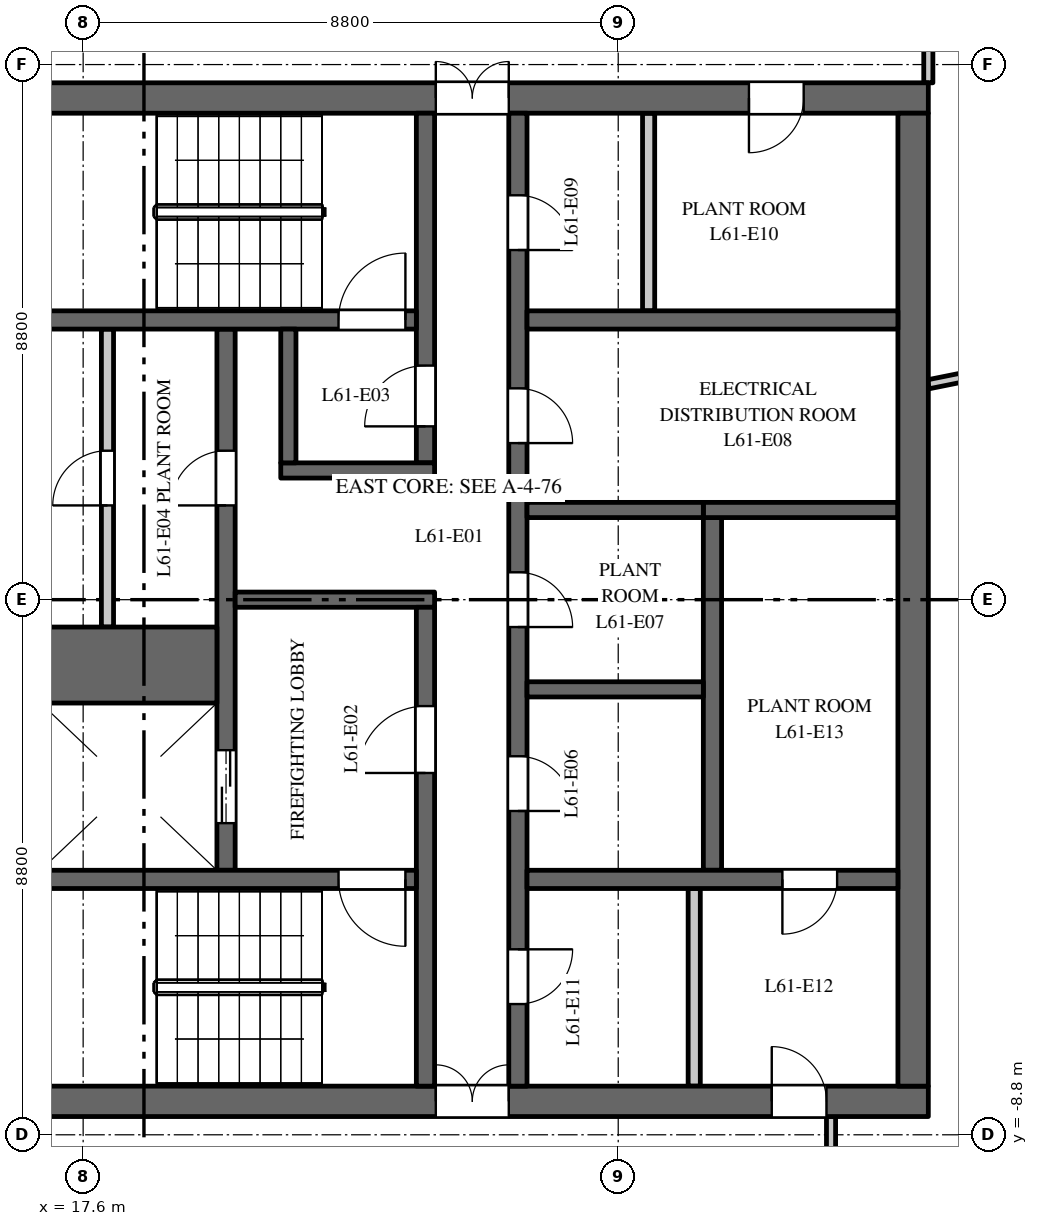
"""IFC4 building model, lengths in metres.
Left out: names, types, materials, properties, quantities, classifications, styles, units other than length and angle.
Written with IfcOpenShell. Run it as: python <this file> out.ifc"""

import sys

from ifc_helpers import new_model, si_unit, direction, frame, frame_2d, origin, place, context, subcontext, project, spatial, rectangle, extrude, element, fill, save


model = new_model("IFC4")
c1 = context("Model", 3, precision=1e-05, world=origin(), true_north=direction((0.0, 1.0)))
c2 = subcontext(c1, "Body", "Model", "MODEL_VIEW")
j1 = project(units=[si_unit("LENGTHUNIT", "METRE"), si_unit("PLANEANGLEUNIT", "RADIAN")], contexts=[c1])
p1 = place(None, origin())
s1 = spatial("IfcSite", under=j1, at=p1, CompositionType="ELEMENT")
p2 = place(p1, origin())
s2 = spatial("IfcBuilding", under=s1, at=p2, CompositionType="ELEMENT")
p3 = place(p2, frame((0.0, 0.0, 285.5)))
s3 = spatial("IfcBuildingStorey", under=s2, at=p3, CompositionType="ELEMENT", Elevation=285.5)
p4 = place(p3, frame((16.5, 8.25, 0.0), z_axis=(0.0, 0.0, 1.0), x_axis=(1.0, 0.0, 0.0)))
e1 = element("IfcWall", 1, at=p4, inside=s3, PredefinedType="SHEAR", context=c2, shape_type="SweptSolid", body=[
    extrude(rectangle(XDim=15.0, YDim=0.5, at=frame_2d((7.5, 0.0))), origin(), (0.0, 0.0, 1.0), 5.2),
])
p5 = place(p4, frame((6.9, 0.0, 0.0)))
e2 = element("IfcOpeningElement", 2, at=p5, cuts=e1, PredefinedType="OPENING", context=c2, shape_type="SweptSolid", body=[
    extrude(rectangle(XDim=1.2, YDim=2.1, at=frame_2d((0.6, 1.05))), frame((0.0, 0.26, 0.0), z_axis=(0.0, -1.0, 0.0), x_axis=(1.0, 0.0, 0.0)), (0.0, 0.0, 1.0), 0.52),
])
p6 = place(p4, frame((12.05, 0.0, 0.0)))
e3 = element("IfcOpeningElement", 3, at=p6, cuts=e1, PredefinedType="OPENING", context=c2, shape_type="SweptSolid", body=[
    extrude(rectangle(XDim=0.9, YDim=2.1, at=frame_2d((0.45, 1.05))), frame((0.0, 0.26, 0.0), z_axis=(0.0, -1.0, 0.0), x_axis=(1.0, 0.0, 0.0)), (0.0, 0.0, 1.0), 0.52),
])
p7 = place(p3, frame((16.5, -8.25, 0.0), z_axis=(0.0, 0.0, 1.0), x_axis=(1.0, 0.0, 0.0)))
e4 = element("IfcWall", 4, at=p7, inside=s3, PredefinedType="SHEAR", context=c2, shape_type="SweptSolid", body=[
    extrude(rectangle(XDim=15.0, YDim=0.5, at=frame_2d((7.5, 0.0))), origin(), (0.0, 0.0, 1.0), 5.2),
])
p8 = place(p7, frame((6.9, 0.0, 0.0)))
e5 = element("IfcOpeningElement", 5, at=p8, cuts=e4, PredefinedType="OPENING", context=c2, shape_type="SweptSolid", body=[
    extrude(rectangle(XDim=1.2, YDim=2.1, at=frame_2d((0.6, 1.05))), frame((0.0, 0.26, 0.0), z_axis=(0.0, -1.0, 0.0), x_axis=(1.0, 0.0, 0.0)), (0.0, 0.0, 1.0), 0.52),
])
p9 = place(p7, frame((12.425, 0.0, 0.0)))
e6 = element("IfcOpeningElement", 6, at=p9, cuts=e4, PredefinedType="OPENING", context=c2, shape_type="SweptSolid", body=[
    extrude(rectangle(XDim=0.9, YDim=2.1, at=frame_2d((0.45, 1.05))), frame((0.0, 0.26, 0.0), z_axis=(0.0, -1.0, 0.0), x_axis=(1.0, 0.0, 0.0)), (0.0, 0.0, 1.0), 0.52),
])
p10 = place(p3, frame((18.0, -0.45, 0.0), z_axis=(0.0, 0.0, 1.0), x_axis=(0.0, 1.0, 0.0)))
e7 = element("IfcWall", 7, at=p10, inside=s3, PredefinedType="PARTITIONING", context=c2, shape_type="SweptSolid", body=[
    extrude(rectangle(XDim=4.9, YDim=0.2, at=frame_2d((2.45, 0.0))), origin(), (0.0, 0.0, 1.0), 5.2),
])
p11 = place(p10, frame((2.0, 0.0, 0.0)))
e8 = element("IfcOpeningElement", 8, at=p11, cuts=e7, PredefinedType="OPENING", context=c2, shape_type="SweptSolid", body=[
    extrude(rectangle(XDim=0.9, YDim=2.1, at=frame_2d((0.45, 1.05))), frame((0.0, 0.11, 0.0), z_axis=(0.0, -1.0, 0.0), x_axis=(1.0, 0.0, 0.0)), (0.0, 0.0, 1.0), 0.22),
])
p12 = place(p3, frame((27.95, -4.45, 0.0), z_axis=(0.0, 0.0, 1.0), x_axis=(0.0, 1.0, 0.0)))
e9 = element("IfcWall", 9, at=p12, inside=s3, PredefinedType="SHEAR", context=c2, shape_type="SweptSolid", body=[
    extrude(rectangle(XDim=5.8, YDim=0.3, at=frame_2d((2.9, 0.0))), origin(), (0.0, 0.0, 1.0), 5.2),
])
p13 = place(p3, frame((27.8, 1.475, 0.0), z_axis=(0.0, 0.0, 1.0), x_axis=(1.0, 0.0, 0.0)))
e10 = element("IfcWall", 10, at=p13, inside=s3, PredefinedType="SHEAR", context=c2, shape_type="SweptSolid", body=[
    extrude(rectangle(XDim=3.2, YDim=0.25, at=frame_2d((1.6, 0.0))), origin(), (0.0, 0.0, 1.0), 5.2),
])
p14 = place(p3, frame((19.95, -4.45, 0.0), z_axis=(0.0, 0.0, 1.0), x_axis=(0.0, 1.0, 0.0)))
e11 = element("IfcWall", 11, at=p14, inside=s3, PredefinedType="SHEAR", context=c2, shape_type="SweptSolid", body=[
    extrude(rectangle(XDim=8.9, YDim=0.3, at=frame_2d((4.45, 0.0))), origin(), (0.0, 0.0, 1.0), 5.2),
])
p15 = place(p14, frame((0.775, 0.0, 0.0)))
e12 = element("IfcOpeningElement", 12, at=p15, cuts=e11, PredefinedType="OPENING", context=c2, shape_type="SweptSolid", body=[
    extrude(rectangle(XDim=1.2, YDim=2.1, at=frame_2d((0.6, 1.05))), frame((0.0, 0.16, 0.0), z_axis=(0.0, -1.0, 0.0), x_axis=(1.0, 0.0, 0.0)), (0.0, 0.0, 1.0), 0.32),
])
p16 = place(p14, frame((6.0, 0.0, 0.0)))
e13 = element("IfcOpeningElement", 13, at=p16, cuts=e11, PredefinedType="OPENING", context=c2, shape_type="SweptSolid", body=[
    extrude(rectangle(XDim=0.9, YDim=2.1, at=frame_2d((0.45, 1.05))), frame((0.0, 0.16, 0.0), z_axis=(0.0, -1.0, 0.0), x_axis=(1.0, 0.0, 0.0)), (0.0, 0.0, 1.0), 0.32),
])
p17 = place(p3, frame((24.75, -8.0, 0.0), z_axis=(0.0, 0.0, 1.0), x_axis=(0.0, 1.0, 0.0)))
e14 = element("IfcWall", 14, at=p17, inside=s3, PredefinedType="SHEAR", context=c2, shape_type="SweptSolid", body=[
    extrude(rectangle(XDim=16.0, YDim=0.3, at=frame_2d((8.0, 0.0))), origin(), (0.0, 0.0, 1.0), 5.2),
])
p18 = place(p17, frame((4.525, 0.0, 0.0)))
e15 = element("IfcOpeningElement", 15, at=p18, cuts=e14, PredefinedType="OPENING", context=c2, shape_type="SweptSolid", body=[
    extrude(rectangle(XDim=0.9, YDim=2.1, at=frame_2d((0.45, 1.05))), frame((0.0, 0.16, 0.0), z_axis=(0.0, -1.0, 0.0), x_axis=(1.0, 0.0, 0.0)), (0.0, 0.0, 1.0), 0.32),
])
p19 = place(p17, frame((7.55, 0.0, 0.0)))
e16 = element("IfcOpeningElement", 16, at=p19, cuts=e14, PredefinedType="OPENING", context=c2, shape_type="SweptSolid", body=[
    extrude(rectangle(XDim=0.9, YDim=2.1, at=frame_2d((0.45, 1.05))), frame((0.0, 0.16, 0.0), z_axis=(0.0, -1.0, 0.0), x_axis=(1.0, 0.0, 0.0)), (0.0, 0.0, 1.0), 0.32),
])
p20 = place(p17, frame((10.575, 0.0, 0.0)))
e17 = element("IfcOpeningElement", 17, at=p20, cuts=e14, PredefinedType="OPENING", context=c2, shape_type="SweptSolid", body=[
    extrude(rectangle(XDim=0.9, YDim=2.1, at=frame_2d((0.45, 1.05))), frame((0.0, 0.16, 0.0), z_axis=(0.0, -1.0, 0.0), x_axis=(1.0, 0.0, 0.0)), (0.0, 0.0, 1.0), 0.32),
])
p21 = place(p17, frame((13.75, 0.0, 0.0)))
e18 = element("IfcOpeningElement", 18, at=p21, cuts=e14, PredefinedType="OPENING", context=c2, shape_type="SweptSolid", body=[
    extrude(rectangle(XDim=0.9, YDim=2.1, at=frame_2d((0.45, 1.05))), frame((0.0, 0.16, 0.0), z_axis=(0.0, -1.0, 0.0), x_axis=(1.0, 0.0, 0.0)), (0.0, 0.0, 1.0), 0.32),
])
p22 = place(p17, frame((1.35, 0.0, 0.0)))
e19 = element("IfcOpeningElement", 19, at=p22, cuts=e14, PredefinedType="OPENING", context=c2, shape_type="SweptSolid", body=[
    extrude(rectangle(XDim=0.9, YDim=2.1, at=frame_2d((0.45, 1.05))), frame((0.0, 0.16, 0.0), z_axis=(0.0, -1.0, 0.0), x_axis=(1.0, 0.0, 0.0)), (0.0, 0.0, 1.0), 0.32),
])
p23 = place(p3, frame((20.1, 0.0, 0.0), z_axis=(0.0, 0.0, 1.0), x_axis=(1.0, 0.0, 0.0)))
e20 = element("IfcWall", 20, at=p23, inside=s3, PredefinedType="SHEAR", context=c2, shape_type="SweptSolid", body=[
    extrude(rectangle(XDim=3.28, YDim=0.25, at=frame_2d((1.64, 0.0))), origin(), (0.0, 0.0, 1.0), 5.2),
])
p24 = place(p3, frame((31.25, -8.0, 0.0), z_axis=(0.0, 0.0, 1.0), x_axis=(0.0, 1.0, 0.0)))
e21 = element("IfcWall", 21, at=p24, inside=s3, PredefinedType="SHEAR", context=c2, shape_type="SweptSolid", body=[
    extrude(rectangle(XDim=16.0, YDim=0.5, at=frame_2d((8.0, 0.0))), origin(), (0.0, 0.0, 1.0), 5.2),
])
p25 = place(p3, frame((24.9, 4.6, 0.0), z_axis=(0.0, 0.0, 1.0), x_axis=(1.0, 0.0, 0.0)))
e22 = element("IfcWall", 22, at=p25, inside=s3, PredefinedType="SHEAR", context=c2, shape_type="SweptSolid", body=[
    extrude(rectangle(XDim=6.1, YDim=0.3, at=frame_2d((3.05, 0.0))), origin(), (0.0, 0.0, 1.0), 5.2),
])
for number, where, z_axis, x_axis in (
    (23, (26.9, 4.75, 0.0), (0.0, 0.0, 1.0), (0.0, 1.0, 0.0)),
    (24, (27.65, -8.0, 0.0), (0.0, 0.0, 1.0), (0.0, 1.0, 0.0)),
):
    element("IfcWall", number, at=place(p3, frame(where, z_axis=z_axis, x_axis=x_axis)), inside=s3, PredefinedType="PARTITIONING", context=c2, shape_type="SweptSolid", body=[
        extrude(rectangle(XDim=3.25, YDim=0.2, at=frame_2d((1.625, 0.0))), origin(), (0.0, 0.0, 1.0), 5.2),
    ])
p26 = place(p3, frame((24.9, -4.6, 0.0), z_axis=(0.0, 0.0, 1.0), x_axis=(1.0, 0.0, 0.0)))
e25 = element("IfcWall", 25, at=p26, inside=s3, PredefinedType="SHEAR", context=c2, shape_type="SweptSolid", body=[
    extrude(rectangle(XDim=6.1, YDim=0.3, at=frame_2d((3.05, 0.0))), origin(), (0.0, 0.0, 1.0), 5.2),
])
p27 = place(p26, frame((4.2, 0.0, 0.0)))
e26 = element("IfcOpeningElement", 26, at=p27, cuts=e25, PredefinedType="OPENING", context=c2, shape_type="SweptSolid", body=[
    extrude(rectangle(XDim=0.9, YDim=2.1, at=frame_2d((0.45, 1.05))), frame((0.0, 0.16, 0.0), z_axis=(0.0, -1.0, 0.0), x_axis=(1.0, 0.0, 0.0)), (0.0, 0.0, 1.0), 0.32),
])
p28 = place(p3, frame((16.9, -1.075, 0.0), z_axis=(0.0, 0.0, 1.0), x_axis=(1.0, 0.0, 0.0)))
e27 = element("IfcWall", 27, at=p28, inside=s3, PredefinedType="SHEAR", context=c2, shape_type="SweptSolid", body=[
    extrude(rectangle(XDim=2.9, YDim=1.25, at=frame_2d((1.45, 0.0))), origin(), (0.0, 0.0, 1.0), 5.2),
])
for number, where, z_axis, x_axis in (
    (28, (24.9, -1.475, 0.0), (0.0, 0.0, 1.0), (1.0, 0.0, 0.0)),
    (29, (24.9, 1.475, 0.0), (0.0, 0.0, 1.0), (1.0, 0.0, 0.0)),
):
    element("IfcWall", number, at=place(p3, frame(where, z_axis=z_axis, x_axis=x_axis)), inside=s3, PredefinedType="SHEAR", context=c2, shape_type="SweptSolid", body=[
        extrude(rectangle(XDim=2.9, YDim=0.25, at=frame_2d((1.45, 0.0))), origin(), (0.0, 0.0, 1.0), 5.2),
    ])
p29 = place(p3, frame((23.23, 2.25, 0.0), z_axis=(0.0, 0.0, 1.0), x_axis=(0.0, 1.0, 0.0)))
e30 = element("IfcWall", 30, at=p29, inside=s3, PredefinedType="SHEAR", context=c2, shape_type="SweptSolid", body=[
    extrude(rectangle(XDim=5.75, YDim=0.3, at=frame_2d((2.875, 0.0))), origin(), (0.0, 0.0, 1.0), 5.2),
])
p30 = place(p29, frame((0.6, 0.0, 0.0)))
e31 = element("IfcOpeningElement", 31, at=p30, cuts=e30, PredefinedType="OPENING", context=c2, shape_type="SweptSolid", body=[
    extrude(rectangle(XDim=1.0, YDim=2.1, at=frame_2d((0.5, 1.05))), frame((0.0, 0.16, 0.0), z_axis=(0.0, -1.0, 0.0), x_axis=(1.0, 0.0, 0.0)), (0.0, 0.0, 1.0), 0.32),
])
p31 = place(p3, frame((23.23, -8.0, 0.0), z_axis=(0.0, 0.0, 1.0), x_axis=(0.0, 1.0, 0.0)))
e32 = element("IfcWall", 32, at=p31, inside=s3, PredefinedType="SHEAR", context=c2, shape_type="SweptSolid", body=[
    extrude(rectangle(XDim=7.875, YDim=0.3, at=frame_2d((3.938, 0.0))), origin(), (0.0, 0.0, 1.0), 5.2),
])
p32 = place(p31, frame((5.15, 0.0, 0.0)))
e33 = element("IfcOpeningElement", 33, at=p32, cuts=e32, PredefinedType="OPENING", context=c2, shape_type="SweptSolid", body=[
    extrude(rectangle(XDim=1.1, YDim=2.1, at=frame_2d((0.55, 1.05))), frame((0.0, 0.16, 0.0), z_axis=(0.0, -1.0, 0.0), x_axis=(1.0, 0.0, 0.0)), (0.0, 0.0, 1.0), 0.32),
])
p33 = place(p3, frame((16.9, 4.6, 0.0), z_axis=(0.0, 0.0, 1.0), x_axis=(1.0, 0.0, 0.0)))
e34 = element("IfcWall", 34, at=p33, inside=s3, PredefinedType="SHEAR", context=c2, shape_type="SweptSolid", body=[
    extrude(rectangle(XDim=6.18, YDim=0.3, at=frame_2d((3.09, 0.0))), origin(), (0.0, 0.0, 1.0), 5.2),
])
p34 = place(p33, frame((4.9, 0.0, 0.0)))
e35 = element("IfcOpeningElement", 35, at=p34, cuts=e34, PredefinedType="OPENING", context=c2, shape_type="SweptSolid", body=[
    extrude(rectangle(XDim=1.1, YDim=2.1, at=frame_2d((0.55, 1.05))), frame((0.0, 0.16, 0.0), z_axis=(0.0, -1.0, 0.0), x_axis=(1.0, 0.0, 0.0)), (0.0, 0.0, 1.0), 0.32),
])
p35 = place(p3, frame((16.9, -4.6, 0.0), z_axis=(0.0, 0.0, 1.0), x_axis=(1.0, 0.0, 0.0)))
e36 = element("IfcWall", 36, at=p35, inside=s3, PredefinedType="SHEAR", context=c2, shape_type="SweptSolid", body=[
    extrude(rectangle(XDim=6.18, YDim=0.3, at=frame_2d((3.09, 0.0))), origin(), (0.0, 0.0, 1.0), 5.2),
])
p36 = place(p35, frame((4.9, 0.0, 0.0)))
e37 = element("IfcOpeningElement", 37, at=p36, cuts=e36, PredefinedType="OPENING", context=c2, shape_type="SweptSolid", body=[
    extrude(rectangle(XDim=1.1, YDim=2.1, at=frame_2d((0.55, 1.05))), frame((0.0, 0.16, 0.0), z_axis=(0.0, -1.0, 0.0), x_axis=(1.0, 0.0, 0.0)), (0.0, 0.0, 1.0), 0.32),
])
p37 = place(p3, frame((20.85, 2.125, 0.0), z_axis=(0.0, 0.0, 1.0), x_axis=(1.0, 0.0, 0.0)))
e38 = element("IfcWall", 38, at=p37, inside=s3, PredefinedType="SHEAR", context=c2, shape_type="SweptSolid", body=[
    extrude(rectangle(XDim=2.53, YDim=0.25, at=frame_2d((1.265, 0.0))), origin(), (0.0, 0.0, 1.0), 5.2),
])
p38 = place(p3, frame((20.975, 2.25, 0.0), z_axis=(0.0, 0.0, 1.0), x_axis=(0.0, 1.0, 0.0)))
e39 = element("IfcWall", 39, at=p38, inside=s3, PredefinedType="SHEAR", context=c2, shape_type="SweptSolid", body=[
    extrude(rectangle(XDim=2.2, YDim=0.25, at=frame_2d((1.1, 0.0))), origin(), (0.0, 0.0, 1.0), 5.2),
])
p39 = place(p3, frame((29.9, -10.7, 0.0), z_axis=(0.0, 0.0, 1.0), x_axis=(0.0, 1.0, 0.0)))
e40 = element("IfcWall", 40, at=p39, inside=s3, PredefinedType="PARTITIONING", context=c2, shape_type="SweptSolid", body=[
    extrude(rectangle(XDim=2.2, YDim=0.15, at=frame_2d((1.1, 0.0))), origin(), (0.0, 0.0, 1.0), 5.2),
])
p40 = place(p39, frame((0.65, 0.0, 0.0)))
e41 = element("IfcOpeningElement", 41, at=p40, cuts=e40, PredefinedType="OPENING", context=c2, shape_type="SweptSolid", body=[
    extrude(rectangle(XDim=1.0, YDim=2.1, at=frame_2d((0.5, 1.05))), frame((0.0, 0.085, 0.0), z_axis=(0.0, -1.0, 0.0), x_axis=(1.0, 0.0, 0.0)), (0.0, 0.0, 1.0), 0.17),
])
p41 = place(p3, frame((31.5, 3.542, 0.0), z_axis=(0.0, 0.0, 1.0), x_axis=(0.98034430806, 0.197294291997, 0.0)))
e42 = element("IfcWall", 42, at=p41, inside=s3, PredefinedType="PARTITIONING", context=c2, shape_type="SweptSolid", body=[
    extrude(rectangle(XDim=3.188, YDim=0.15, at=frame_2d((1.594, 0.0))), origin(), (0.0, 0.0, 1.0), 5.2),
])
p42 = place(p3, frame((31.5, 8.5, 0.0), z_axis=(0.0, 0.0, 1.0), x_axis=(0.0, 1.0, 0.0)))
e43 = element("IfcWall", 43, at=p42, inside=s3, PredefinedType="PARTITIONING", context=c2, shape_type="SweptSolid", body=[
    extrude(rectangle(XDim=2.2, YDim=0.15, at=frame_2d((1.1, 0.0))), origin(), (0.0, 0.0, 1.0), 5.2),
])
p43 = place(p15, origin())
e44 = element("IfcDoor", 44, at=p43, inside=s3, OperationType="DOUBLE_DOOR_SLIDING", PredefinedType="DOOR", context=c2, shape_type="SweptSolid", body=[
    extrude(rectangle(XDim=1.2, YDim=2.1, at=frame_2d((0.6, 1.05))), frame((0.0, 0.025, 0.0), z_axis=(0.0, -1.0, 0.0), x_axis=(1.0, 0.0, 0.0)), (0.0, 0.0, 1.0), 0.05),
])
fill(e12, e44)
p44 = place(p34, origin())
e45 = element("IfcDoor", 45, at=p44, inside=s3, OperationType="SINGLE_SWING_LEFT", PredefinedType="DOOR", context=c2, shape_type="SweptSolid", body=[
    extrude(rectangle(XDim=1.1, YDim=2.1, at=frame_2d((0.55, 1.05))), frame((0.0, 0.025, 0.0), z_axis=(0.0, -1.0, 0.0), x_axis=(1.0, 0.0, 0.0)), (0.0, 0.0, 1.0), 0.05),
])
fill(e35, e45)
p45 = place(p36, origin())
e46 = element("IfcDoor", 46, at=p45, inside=s3, OperationType="SINGLE_SWING_RIGHT", PredefinedType="DOOR", context=c2, shape_type="SweptSolid", body=[
    extrude(rectangle(XDim=1.1, YDim=2.1, at=frame_2d((0.55, 1.05))), frame((0.0, 0.025, 0.0), z_axis=(0.0, -1.0, 0.0), x_axis=(1.0, 0.0, 0.0)), (0.0, 0.0, 1.0), 0.05),
])
fill(e37, e46)
p46 = place(p32, origin())
e47 = element("IfcDoor", 47, at=p46, inside=s3, OperationType="SINGLE_SWING_RIGHT", PredefinedType="DOOR", context=c2, shape_type="SweptSolid", body=[
    extrude(rectangle(XDim=1.1, YDim=2.1, at=frame_2d((0.55, 1.05))), frame((0.0, 0.025, 0.0), z_axis=(0.0, -1.0, 0.0), x_axis=(1.0, 0.0, 0.0)), (0.0, 0.0, 1.0), 0.05),
])
fill(e33, e47)
p47 = place(p30, origin())
e48 = element("IfcDoor", 48, at=p47, inside=s3, OperationType="SINGLE_SWING_RIGHT", PredefinedType="DOOR", context=c2, shape_type="SweptSolid", body=[
    extrude(rectangle(XDim=1.0, YDim=2.1, at=frame_2d((0.5, 1.05))), frame((0.0, 0.025, 0.0), z_axis=(0.0, -1.0, 0.0), x_axis=(1.0, 0.0, 0.0)), (0.0, 0.0, 1.0), 0.05),
])
fill(e31, e48)
p48 = place(p5, origin())
e49 = element("IfcDoor", 49, at=p48, inside=s3, OperationType="DOUBLE_DOOR_DOUBLE_SWING", PredefinedType="DOOR", context=c2, shape_type="SweptSolid", body=[
    extrude(rectangle(XDim=1.2, YDim=2.1, at=frame_2d((0.6, 1.05))), frame((0.0, 0.025, 0.0), z_axis=(0.0, -1.0, 0.0), x_axis=(1.0, 0.0, 0.0)), (0.0, 0.0, 1.0), 0.05),
])
fill(e2, e49)
p49 = place(p8, origin())
e50 = element("IfcDoor", 50, at=p49, inside=s3, OperationType="DOUBLE_DOOR_DOUBLE_SWING", PredefinedType="DOOR", context=c2, shape_type="SweptSolid", body=[
    extrude(rectangle(XDim=1.2, YDim=2.1, at=frame_2d((0.6, 1.05))), frame((0.0, 0.025, 0.0), z_axis=(0.0, -1.0, 0.0), x_axis=(1.0, 0.0, 0.0)), (0.0, 0.0, 1.0), 0.05),
])
fill(e5, e50)
p50 = place(p16, origin())
e51 = element("IfcDoor", 51, at=p50, inside=s3, OperationType="SINGLE_SWING_RIGHT", PredefinedType="DOOR", context=c2, shape_type="SweptSolid", body=[
    extrude(rectangle(XDim=0.9, YDim=2.1, at=frame_2d((0.45, 1.05))), frame((0.0, 0.025, 0.0), z_axis=(0.0, -1.0, 0.0), x_axis=(1.0, 0.0, 0.0)), (0.0, 0.0, 1.0), 0.05),
])
fill(e13, e51)
p51 = place(p11, origin())
e52 = element("IfcDoor", 52, at=p51, inside=s3, OperationType="SINGLE_SWING_RIGHT", PredefinedType="DOOR", context=c2, shape_type="SweptSolid", body=[
    extrude(rectangle(XDim=0.9, YDim=2.1, at=frame_2d((0.45, 1.05))), frame((0.0, 0.025, 0.0), z_axis=(0.0, -1.0, 0.0), x_axis=(1.0, 0.0, 0.0)), (0.0, 0.0, 1.0), 0.05),
])
fill(e8, e52)
p52 = place(p18, origin())
e53 = element("IfcDoor", 53, at=p52, inside=s3, OperationType="SINGLE_SWING_LEFT", PredefinedType="DOOR", context=c2, shape_type="SweptSolid", body=[
    extrude(rectangle(XDim=0.9, YDim=2.1, at=frame_2d((0.45, 1.05))), frame((0.0, 0.025, 0.0), z_axis=(0.0, -1.0, 0.0), x_axis=(1.0, 0.0, 0.0)), (0.0, 0.0, 1.0), 0.05),
])
fill(e15, e53)
p53 = place(p19, origin())
e54 = element("IfcDoor", 54, at=p53, inside=s3, OperationType="SINGLE_SWING_LEFT", PredefinedType="DOOR", context=c2, shape_type="SweptSolid", body=[
    extrude(rectangle(XDim=0.9, YDim=2.1, at=frame_2d((0.45, 1.05))), frame((0.0, 0.025, 0.0), z_axis=(0.0, -1.0, 0.0), x_axis=(1.0, 0.0, 0.0)), (0.0, 0.0, 1.0), 0.05),
])
fill(e16, e54)
p54 = place(p20, origin())
e55 = element("IfcDoor", 55, at=p54, inside=s3, OperationType="SINGLE_SWING_LEFT", PredefinedType="DOOR", context=c2, shape_type="SweptSolid", body=[
    extrude(rectangle(XDim=0.9, YDim=2.1, at=frame_2d((0.45, 1.05))), frame((0.0, 0.025, 0.0), z_axis=(0.0, -1.0, 0.0), x_axis=(1.0, 0.0, 0.0)), (0.0, 0.0, 1.0), 0.05),
])
fill(e17, e55)
p55 = place(p21, origin())
e56 = element("IfcDoor", 56, at=p55, inside=s3, OperationType="SINGLE_SWING_LEFT", PredefinedType="DOOR", context=c2, shape_type="SweptSolid", body=[
    extrude(rectangle(XDim=0.9, YDim=2.1, at=frame_2d((0.45, 1.05))), frame((0.0, 0.025, 0.0), z_axis=(0.0, -1.0, 0.0), x_axis=(1.0, 0.0, 0.0)), (0.0, 0.0, 1.0), 0.05),
])
fill(e18, e56)
p56 = place(p6, origin())
e57 = element("IfcDoor", 57, at=p56, inside=s3, OperationType="SINGLE_SWING_LEFT", PredefinedType="DOOR", context=c2, shape_type="SweptSolid", body=[
    extrude(rectangle(XDim=0.9, YDim=2.1, at=frame_2d((0.45, 1.05))), frame((0.0, 0.025, 0.0), z_axis=(0.0, -1.0, 0.0), x_axis=(1.0, 0.0, 0.0)), (0.0, 0.0, 1.0), 0.05),
])
fill(e3, e57)
p57 = place(p22, origin())
e58 = element("IfcDoor", 58, at=p57, inside=s3, OperationType="SINGLE_SWING_RIGHT", PredefinedType="DOOR", context=c2, shape_type="SweptSolid", body=[
    extrude(rectangle(XDim=0.9, YDim=2.1, at=frame_2d((0.45, 1.05))), frame((0.0, 0.025, 0.0), z_axis=(0.0, -1.0, 0.0), x_axis=(1.0, 0.0, 0.0)), (0.0, 0.0, 1.0), 0.05),
])
fill(e19, e58)
p58 = place(p9, origin())
e59 = element("IfcDoor", 59, at=p58, inside=s3, OperationType="SINGLE_SWING_RIGHT", PredefinedType="DOOR", context=c2, shape_type="SweptSolid", body=[
    extrude(rectangle(XDim=0.9, YDim=2.1, at=frame_2d((0.45, 1.05))), frame((0.0, 0.025, 0.0), z_axis=(0.0, -1.0, 0.0), x_axis=(1.0, 0.0, 0.0)), (0.0, 0.0, 1.0), 0.05),
])
fill(e6, e59)
p59 = place(p27, origin())
e60 = element("IfcDoor", 60, at=p59, inside=s3, OperationType="SINGLE_SWING_LEFT", PredefinedType="DOOR", context=c2, shape_type="SweptSolid", body=[
    extrude(rectangle(XDim=0.9, YDim=2.1, at=frame_2d((0.45, 1.05))), frame((0.0, 0.025, 0.0), z_axis=(0.0, -1.0, 0.0), x_axis=(1.0, 0.0, 0.0)), (0.0, 0.0, 1.0), 0.05),
])
fill(e26, e60)
save(model, sys.argv[1])
